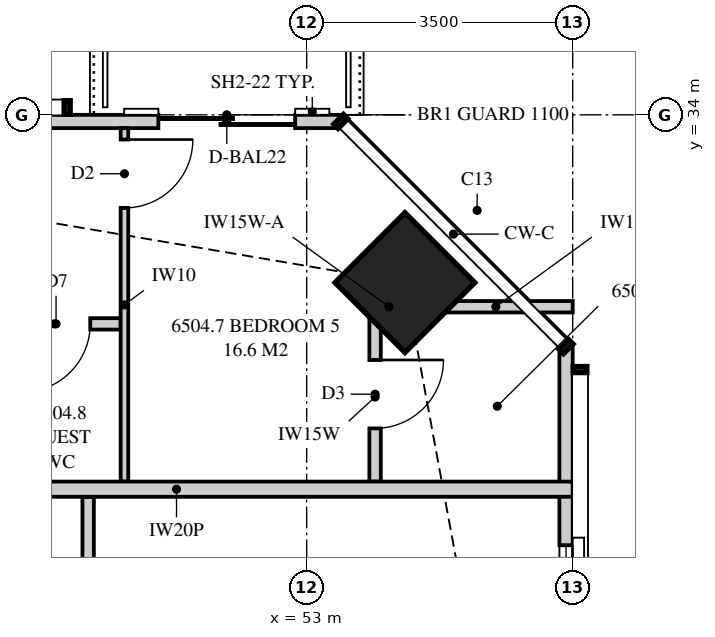
"""IFC4 building model, lengths in metres.
Left out: names, types, materials, properties, quantities, classifications, styles, units other than length and angle.
Written with IfcOpenShell. Run it as: python <this file> out.ifc"""

import sys

from ifc_helpers import new_model, si_unit, direction, frame, frame_2d, origin, origin_2d, place, context, subcontext, project, spatial, polyline, rectangle, outline, extrude, element, fill, save


model = new_model("IFC4")
c1 = context("Model", 3, precision=1e-05, world=origin(), true_north=direction((0.0, 1.0)))
c2 = subcontext(c1, "Body", "Model", "MODEL_VIEW")
j1 = project(units=[si_unit("LENGTHUNIT", "METRE"), si_unit("PLANEANGLEUNIT", "RADIAN")], contexts=[c1])
p1 = place(None, origin())
s1 = spatial("IfcSite", under=j1, at=p1, CompositionType="ELEMENT")
p2 = place(p1, origin())
s2 = spatial("IfcBuilding", under=s1, at=p2, CompositionType="ELEMENT")
p3 = place(p2, frame((0.0, 0.0, 238.95)))
s3 = spatial("IfcBuildingStorey", under=s2, at=p3, CompositionType="ELEMENT", Elevation=238.95)
p4 = place(p3, frame((54.293, 31.793, 0.0), z_axis=(0.0, 0.0, 1.0), x_axis=(0.707106781187, 0.707106781187, 0.0)))
e1 = element("IfcColumn", 1, at=p4, inside=s3, PredefinedType="COLUMN", context=c2, shape_type="SweptSolid", body=[
    extrude(rectangle(XDim=1.3, YDim=1.3, at=origin_2d()), origin(), (0.0, 0.0, 1.0), 3.5),
])
p5 = place(p3, frame((56.413, 20.55, 0.0), z_axis=(0.0, 0.0, 1.0), x_axis=(0.0, 1.0, 0.0)))
e2 = element("IfcWall", 2, at=p5, inside=s3, PredefinedType="SOLIDWALL", context=c2, shape_type="SweptSolid", body=[
    extrude(outline(polyline([(0.0, 0.0), (10.399, 0.0), (10.399, 3.26), (4.658, 3.26), (4.658, 2.3), (4.594, 2.3), (4.594, 3.26), (4.45, 3.26), (4.45, 2.3), (0.0, 2.3), (0.0, 0.0)])), frame((0.0, 0.087, 0.0), z_axis=(0.0, -1.0, 0.0), x_axis=(1.0, 0.0, 0.0)), (0.0, 0.0, 1.0), 0.175),
])
p6 = place(p5, frame((1.2, 0.0, 0.4)))
e3 = element("IfcOpeningElement", 3, at=p6, cuts=e2, PredefinedType="OPENING", context=c2, shape_type="SweptSolid", body=[
    extrude(rectangle(XDim=2.4, YDim=1.85, at=frame_2d((1.2, 0.925))), frame((0.0, 0.097, 0.0), z_axis=(0.0, -1.0, 0.0), x_axis=(1.0, 0.0, 0.0)), (0.0, 0.0, 1.0), 0.195),
])
p7 = place(p5, frame((5.988, 0.0, 0.4)))
e4 = element("IfcOpeningElement", 4, at=p7, cuts=e2, PredefinedType="OPENING", context=c2, shape_type="SweptSolid", body=[
    extrude(rectangle(XDim=1.8, YDim=1.85, at=frame_2d((0.9, 0.925))), frame((0.0, 0.097, 0.0), z_axis=(0.0, -1.0, 0.0), x_axis=(1.0, 0.0, 0.0)), (0.0, 0.0, 1.0), 0.195),
])
p8 = place(p3, frame((53.449, 33.913, 0.0), z_axis=(0.0, 0.0, 1.0), x_axis=(-1.0, 0.0, 0.0)))
e5 = element("IfcWall", 5, at=p8, inside=s3, PredefinedType="SOLIDWALL", context=c2, shape_type="SweptSolid", body=[
    extrude(outline(polyline([(0.0, 0.0), (33.597, 0.0), (33.597, 3.26), (26.039, 3.26), (26.039, 2.3), (25.955, 2.3), (25.955, 3.26), (25.824, 3.26), (25.824, 2.3), (6.574, 2.3), (6.574, 3.26), (6.442, 3.26), (6.442, 2.3), (6.359, 2.3), (6.359, 3.26), (0.0, 3.26), (0.0, 0.0)])), frame((0.0, 0.087, 0.0), z_axis=(0.0, -1.0, 0.0), x_axis=(1.0, 0.0, 0.0)), (0.0, 0.0, 1.0), 0.175),
])
p9 = place(p8, frame((0.6, 0.0, 0.0)))
e6 = element("IfcOpeningElement", 6, at=p9, cuts=e5, PredefinedType="OPENING", context=c2, shape_type="SweptSolid", body=[
    extrude(rectangle(XDim=1.8, YDim=2.25, at=frame_2d((0.9, 1.125))), frame((0.0, 0.097, 0.0), z_axis=(0.0, -1.0, 0.0), x_axis=(1.0, 0.0, 0.0)), (0.0, 0.0, 1.0), 0.195),
])
p10 = place(p8, frame((9.76, 0.0, 0.4)))
e7 = element("IfcOpeningElement", 7, at=p10, cuts=e5, PredefinedType="OPENING", context=c2, shape_type="SweptSolid", body=[
    extrude(rectangle(XDim=2.4, YDim=1.85, at=frame_2d((1.2, 0.925))), frame((0.0, 0.097, 0.0), z_axis=(0.0, -1.0, 0.0), x_axis=(1.0, 0.0, 0.0)), (0.0, 0.0, 1.0), 0.195),
])
p11 = place(p8, frame((19.974, 0.0, 0.4)))
e8 = element("IfcOpeningElement", 8, at=p11, cuts=e5, PredefinedType="OPENING", context=c2, shape_type="SweptSolid", body=[
    extrude(rectangle(XDim=1.8, YDim=1.85, at=frame_2d((0.9, 0.925))), frame((0.0, 0.097, 0.0), z_axis=(0.0, -1.0, 0.0), x_axis=(1.0, 0.0, 0.0)), (0.0, 0.0, 1.0), 0.195),
])
p12 = place(p8, frame((23.144, 0.0, 0.4)))
e9 = element("IfcOpeningElement", 9, at=p12, cuts=e5, PredefinedType="OPENING", context=c2, shape_type="SweptSolid", body=[
    extrude(rectangle(XDim=1.8, YDim=1.85, at=frame_2d((0.9, 0.925))), frame((0.0, 0.097, 0.0), z_axis=(0.0, -1.0, 0.0), x_axis=(1.0, 0.0, 0.0)), (0.0, 0.0, 1.0), 0.195),
])
p13 = place(p8, frame((29.273, 0.0, 0.4)))
e10 = element("IfcOpeningElement", 10, at=p13, cuts=e5, PredefinedType="OPENING", context=c2, shape_type="SweptSolid", body=[
    extrude(rectangle(XDim=1.8, YDim=1.85, at=frame_2d((0.9, 0.925))), frame((0.0, 0.097, 0.0), z_axis=(0.0, -1.0, 0.0), x_axis=(1.0, 0.0, 0.0)), (0.0, 0.0, 1.0), 0.195),
])
p14 = place(p3, frame((53.975, 31.475, 0.0), z_axis=(0.0, 0.0, 1.0), x_axis=(1.0, 0.0, 0.0)))
e11 = element("IfcWall", 11, at=p14, inside=s3, PredefinedType="PLUMBINGWALL", context=c2, shape_type="SweptSolid", body=[
    extrude(rectangle(XDim=0.217, YDim=0.15, at=frame_2d((0.108, 0.0))), origin(), (0.0, 0.0, 1.0), 2.3),
])
p15 = place(p3, frame((54.478, 31.475, 0.0), z_axis=(0.0, 0.0, 1.0), x_axis=(1.0, 0.0, 0.0)))
e12 = element("IfcWall", 12, at=p15, inside=s3, PredefinedType="PLUMBINGWALL", context=c2, shape_type="SweptSolid", body=[
    extrude(outline(polyline([(0.774, 3.26), (0.774, 2.3), (0.325, 2.3), (0.0, 1.15), (0.325, 0.0), (2.022, 0.0), (2.022, 3.26), (0.774, 3.26)])), frame((0.0, 0.075, 0.0), z_axis=(0.0, -1.0, 0.0), x_axis=(1.0, 0.0, 0.0)), (0.0, 0.0, 1.0), 0.15),
])
p16 = place(p3, frame((53.9, 31.4, 0.0), z_axis=(0.0, 0.0, 1.0), x_axis=(0.0, -1.0, 0.0)))
e13 = element("IfcWall", 13, at=p16, inside=s3, PredefinedType="PLUMBINGWALL", context=c2, shape_type="SweptSolid", body=[
    extrude(outline(polyline([(0.0, 0.0), (2.225, 0.0), (2.225, 3.26), (2.225, 2.3), (0.438, 2.3), (0.0, 2.3), (0.0, 3.26), (0.0, 0.0)])), frame((0.0, 0.075, 0.0), z_axis=(0.0, -1.0, 0.0), x_axis=(1.0, 0.0, 0.0)), (0.0, 0.0, 1.0), 0.15),
])
p17 = place(p16, frame((0.625, 0.0, 0.0)))
e14 = element("IfcOpeningElement", 14, at=p17, cuts=e13, PredefinedType="OPENING", context=c2, shape_type="SweptSolid", body=[
    extrude(rectangle(XDim=0.9, YDim=2.1, at=frame_2d((0.45, 1.05))), frame((0.0, 0.085, 0.0), z_axis=(0.0, -1.0, 0.0), x_axis=(1.0, 0.0, 0.0)), (0.0, 0.0, 1.0), 0.17),
])
p18 = place(p3, frame((50.603, 33.825, 0.0), z_axis=(0.0, 0.0, 1.0), x_axis=(0.0, -1.0, 0.0)))
e15 = element("IfcWall", 15, at=p18, inside=s3, PredefinedType="PARTITIONING", context=c2, shape_type="SweptSolid", body=[
    extrude(outline(polyline([(0.0, 0.0), (4.65, 0.0), (4.65, 3.26), (2.279, 3.26), (2.279, 2.3), (0.534, 2.3), (0.534, 3.26), (0.0, 3.26), (0.0, 0.0)])), frame((0.0, 0.05, 0.0), z_axis=(0.0, -1.0, 0.0), x_axis=(1.0, 0.0, 0.0)), (0.0, 0.0, 1.0), 0.1),
])
p19 = place(p18, frame((0.15, 0.0, 0.0)))
e16 = element("IfcOpeningElement", 16, at=p19, cuts=e15, PredefinedType="OPENING", context=c2, shape_type="SweptSolid", body=[
    extrude(rectangle(XDim=0.9, YDim=2.1, at=frame_2d((0.45, 1.05))), frame((0.0, 0.06, 0.0), z_axis=(0.0, -1.0, 0.0), x_axis=(1.0, 0.0, 0.0)), (0.0, 0.0, 1.0), 0.12),
])
p20 = place(p3, frame((46.075, 29.075, 0.0), z_axis=(0.0, 0.0, 1.0), x_axis=(1.0, 0.0, 0.0)))
e17 = element("IfcWall", 17, at=p20, inside=s3, PredefinedType="PARTITIONING", context=c2, shape_type="SweptSolid", body=[
    extrude(outline(polyline([(0.0, 0.0), (10.425, 0.0), (10.425, 3.26), (9.646, 3.26), (9.646, 2.3), (7.795, 2.3), (7.795, 3.26), (2.11, 3.26), (2.11, 2.66), (0.0, 2.66), (0.0, 3.26), (0.0, 0.0)])), frame((0.0, 0.1, 0.0), z_axis=(0.0, -1.0, 0.0), x_axis=(1.0, 0.0, 0.0)), (0.0, 0.0, 1.0), 0.2),
])
p21 = place(p3, frame((50.125, 25.85, 0.0), z_axis=(0.0, 0.0, 1.0), x_axis=(0.0, 1.0, 0.0)))
e18 = element("IfcWall", 18, at=p21, inside=s3, PredefinedType="PLUMBINGWALL", context=c2, shape_type="SweptSolid", body=[
    extrude(outline(polyline([(0.0, 0.0), (3.125, 0.0), (3.125, 3.26), (0.435, 3.26), (0.435, 2.66), (0.0, 2.66), (0.0, 3.26), (0.0, 0.0)])), frame((0.0, 0.075, 0.0), z_axis=(0.0, -1.0, 0.0), x_axis=(1.0, 0.0, 0.0)), (0.0, 0.0, 1.0), 0.15),
])
p22 = place(p21, frame((0.4, 0.0, 0.0)))
e19 = element("IfcOpeningElement", 19, at=p22, cuts=e18, PredefinedType="OPENING", context=c2, shape_type="SweptSolid", body=[
    extrude(rectangle(XDim=0.9, YDim=2.1, at=frame_2d((0.45, 1.05))), frame((0.0, 0.085, 0.0), z_axis=(0.0, -1.0, 0.0), x_axis=(1.0, 0.0, 0.0)), (0.0, 0.0, 1.0), 0.17),
])
p23 = place(p3, frame((50.552, 31.25, 0.0), z_axis=(0.0, 0.0, 1.0), x_axis=(-1.0, 0.0, 0.0)))
e20 = element("IfcWall", 20, at=p23, inside=s3, PredefinedType="PLUMBINGWALL", context=c2, shape_type="SweptSolid", body=[
    extrude(rectangle(XDim=1.75, YDim=0.15, at=frame_2d((0.875, 0.0))), origin(), (0.0, 0.0, 1.0), 3.26),
])
p24 = place(p23, frame((0.4, 0.0, 0.0)))
e21 = element("IfcOpeningElement", 21, at=p24, cuts=e20, PredefinedType="OPENING", context=c2, shape_type="SweptSolid", body=[
    extrude(rectangle(XDim=0.9, YDim=2.1, at=frame_2d((0.45, 1.05))), frame((0.0, 0.085, 0.0), z_axis=(0.0, -1.0, 0.0), x_axis=(1.0, 0.0, 0.0)), (0.0, 0.0, 1.0), 0.17),
])
p25 = place(p7, origin())
e22 = element("IfcWindow", 22, at=p25, inside=s3, PartitioningType="SINGLE_PANEL", PredefinedType="WINDOW", context=c2, shape_type="SweptSolid", body=[
    extrude(rectangle(XDim=1.8, YDim=1.85, at=frame_2d((0.9, 0.925))), frame((0.0, 0.03, 0.0), z_axis=(0.0, -1.0, 0.0), x_axis=(1.0, 0.0, 0.0)), (0.0, 0.0, 1.0), 0.06),
])
fill(e4, e22)
p26 = place(p9, origin())
e23 = element("IfcDoor", 23, at=p26, inside=s3, OperationType="SLIDING_TO_LEFT", PredefinedType="DOOR", context=c2, shape_type="SweptSolid", body=[
    extrude(rectangle(XDim=1.8, YDim=2.25, at=frame_2d((0.9, 1.125))), frame((0.0, 0.025, 0.0), z_axis=(0.0, -1.0, 0.0), x_axis=(1.0, 0.0, 0.0)), (0.0, 0.0, 1.0), 0.05),
])
fill(e6, e23)
p27 = place(p17, origin())
e24 = element("IfcDoor", 24, at=p27, inside=s3, OperationType="SINGLE_SWING_LEFT", PredefinedType="DOOR", context=c2, shape_type="SweptSolid", body=[
    extrude(rectangle(XDim=0.9, YDim=2.1, at=frame_2d((0.45, 1.05))), frame((0.0, 0.025, 0.0), z_axis=(0.0, -1.0, 0.0), x_axis=(1.0, 0.0, 0.0)), (0.0, 0.0, 1.0), 0.05),
])
fill(e14, e24)
p28 = place(p19, origin())
e25 = element("IfcDoor", 25, at=p28, inside=s3, OperationType="SINGLE_SWING_LEFT", PredefinedType="DOOR", context=c2, shape_type="SweptSolid", body=[
    extrude(rectangle(XDim=0.9, YDim=2.1, at=frame_2d((0.45, 1.05))), frame((0.0, 0.025, 0.0), z_axis=(0.0, -1.0, 0.0), x_axis=(1.0, 0.0, 0.0)), (0.0, 0.0, 1.0), 0.05),
])
fill(e16, e25)
p29 = place(p24, origin())
e26 = element("IfcDoor", 26, at=p29, inside=s3, OperationType="SINGLE_SWING_RIGHT", PredefinedType="DOOR", context=c2, shape_type="SweptSolid", body=[
    extrude(rectangle(XDim=0.9, YDim=2.1, at=frame_2d((0.45, 1.05))), frame((0.0, 0.025, 0.0), z_axis=(0.0, -1.0, 0.0), x_axis=(1.0, 0.0, 0.0)), (0.0, 0.0, 1.0), 0.05),
])
fill(e21, e26)
save(model, sys.argv[1])
